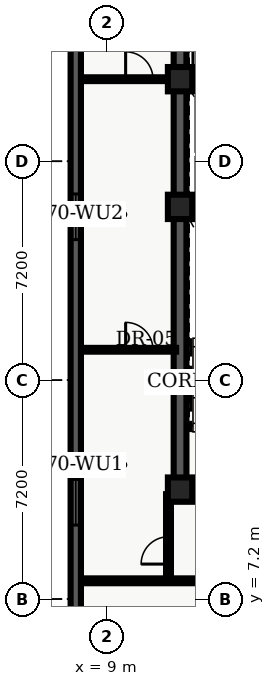
"""IFC4 building model, lengths in metres.
Left out: names, types, materials, properties, quantities, classifications, styles, units other than length and angle.
Written with IfcOpenShell. Run it as: python <this file> out.ifc"""

import sys

from ifc_helpers import new_model, entity, si_unit, converted_unit, direction, frame, origin_with_axes, origin_2d_with_axis, place, context, subcontext, project, spatial, polyline, rectangle, outline, extrude, element, fill, save


model = new_model("IFC4")
c1 = context("Model", 3, precision=1e-05, world=origin_with_axes(), true_north=direction((0.0, 1.0)))
c2 = subcontext(c1, "Body", "Model", "MODEL_VIEW")
j1 = project(units=[si_unit("LENGTHUNIT", "METRE"), converted_unit("PLANEANGLEUNIT", "DEGREE", entity("IfcPlaneAngleMeasure", 0.017), si_unit("PLANEANGLEUNIT", "RADIAN"), dimensions=[0, 0, 0, 0, 0, 0, 0])], contexts=[c1])
p1 = place(None, origin_with_axes())
s1 = spatial("IfcSite", under=j1, at=p1, CompositionType="ELEMENT")
p2 = place(p1, origin_with_axes())
s2 = spatial("IfcBuilding", under=s1, at=p2, CompositionType="ELEMENT")
p3 = place(p2, frame((0.0, 0.0, 284.1), z_axis=(0.0, 0.0, 1.0), x_axis=(1.0, 0.0, 0.0)))
s3 = spatial("IfcBuildingStorey", under=s2, at=p3, CompositionType="ELEMENT", Elevation=284.1)
p4 = place(p3, frame((11.4, 10.8, 0.0), z_axis=(0.0, 0.0, 1.0), x_axis=(0.0, 1.0, 0.0)))
e1 = element("IfcWall", 1, at=p4, inside=s3, PredefinedType="SHEAR", context=c2, shape_type="SweptSolid", body=[
    extrude(outline(polyline([(0.0, -0.21), (27.0, -0.21), (27.0, 0.21), (0.0, 0.21), (0.0, -0.21)])), origin_with_axes(), (0.0, 0.0, 1.0), 3.6),
])
p5 = place(p3, frame((11.4, 10.8, 0.0), z_axis=(0.0, 0.0, 1.0), x_axis=(1.0, 0.0, 0.0)))
e2 = element("IfcWall", 2, at=p5, inside=s3, PredefinedType="SHEAR", context=c2, shape_type="SweptSolid", body=[
    extrude(outline(polyline([(0.0, -0.21), (7.2, -0.21), (7.2, 0.21), (0.0, 0.21), (0.0, -0.21)])), origin_with_axes(), (0.0, 0.0, 1.0), 3.6),
])
p6 = place(p5, frame((2.625, 0.0, 0.0), z_axis=(0.0, 0.0, 1.0), x_axis=(1.0, 0.0, 0.0)))
e3 = element("IfcOpeningElement", 3, at=p6, cuts=e2, PredefinedType="OPENING", context=c2, shape_type="SweptSolid", body=[
    extrude(rectangle(XDim=1.05, YDim=0.44, at=origin_2d_with_axis()), origin_with_axes(), (0.0, 0.0, 1.0), 2.15),
])
p7 = place(p3, frame((11.61, 19.825, 0.0), z_axis=(0.0, 0.0, 1.0), x_axis=(1.0, 0.0, 0.0)))
e4 = element("IfcWall", 4, at=p7, inside=s3, PredefinedType="SHEAR", context=c2, shape_type="SweptSolid", body=[
    extrude(outline(polyline([(0.0, -0.125), (6.78, -0.125), (6.78, 0.125), (0.0, 0.125), (0.0, -0.125)])), origin_with_axes(), (0.0, 0.0, 1.0), 3.6),
])
p8 = place(p3, frame((11.7, 24.1, 0.0), z_axis=(0.0, 0.0, 1.0), x_axis=(1.0, 0.0, 0.0)))
e5 = element("IfcWall", 5, at=p8, inside=s3, PredefinedType="SOLIDWALL", context=c2, shape_type="SweptSolid", body=[
    extrude(outline(polyline([(0.0, -0.125), (6.6, -0.125), (6.6, 0.125), (0.0, 0.125), (0.0, -0.125)])), origin_with_axes(), (0.0, 0.0, 1.0), 2.64),
])
p9 = place(p8, frame((3.75, 0.0, 0.0), z_axis=(0.0, 0.0, 1.0), x_axis=(1.0, 0.0, 0.0)))
e6 = element("IfcOpeningElement", 6, at=p9, cuts=e5, PredefinedType="OPENING", context=c2, shape_type="SweptSolid", body=[
    extrude(rectangle(XDim=0.9, YDim=0.27, at=origin_2d_with_axis()), origin_with_axes(), (0.0, 0.0, 1.0), 2.15),
])
for number, where, z_axis, x_axis in (
    (7, (11.4, 10.8, 0.0), (0.0, 0.0, 1.0), (1.0, 0.0, 0.0)),
    (8, (11.4, 20.1, 0.0), (0.0, 0.0, 1.0), (1.0, 0.0, 0.0)),
    (9, (11.4, 24.3, 0.0), (0.0, 0.0, 1.0), (1.0, 0.0, 0.0)),
):
    element("IfcColumn", number, at=place(p3, frame(where, z_axis=z_axis, x_axis=x_axis)), inside=s3, PredefinedType="COLUMN", context=c2, shape_type="SweptSolid", body=[
        extrude(rectangle(XDim=0.8, YDim=0.8, at=origin_2d_with_axis()), origin_with_axes(), (0.0, 0.0, 1.0), 3.9),
    ])
p10 = place(p3, frame((8.135, 7.8, 0.0), z_axis=(0.0, 0.0, 1.0), x_axis=(1.0, 0.0, 0.0)))
e10 = element("IfcWall", 10, at=p10, inside=s3, PredefinedType="PARTITIONING", context=c2, shape_type="SweptSolid", body=[
    extrude(outline(polyline([(0.0, -0.08), (12.165, -0.08), (12.165, 0.08), (0.0, 0.08), (0.0, -0.08)])), origin_with_axes(), (0.0, 0.0, 1.0), 2.64),
])
p11 = place(p10, frame((6.065, 0.0, 0.0), z_axis=(0.0, 0.0, 1.0), x_axis=(1.0, 0.0, 0.0)))
e11 = element("IfcOpeningElement", 11, at=p11, cuts=e10, PredefinedType="OPENING", context=c2, shape_type="SweptSolid", body=[
    extrude(rectangle(XDim=1.0, YDim=0.18, at=origin_2d_with_axis()), origin_with_axes(), (0.0, 0.0, 1.0), 2.15),
])
p12 = place(p3, frame((11.02, 7.8, 0.0), z_axis=(0.0, 0.0, 1.0), x_axis=(0.0, 1.0, 0.0)))
e12 = element("IfcWall", 12, at=p12, inside=s3, PredefinedType="PARTITIONING", context=c2, shape_type="SweptSolid", body=[
    extrude(outline(polyline([(0.0, -0.08), (2.85, -0.08), (2.85, 0.08), (0.0, 0.08), (0.0, -0.08)])), origin_with_axes(), (0.0, 0.0, 1.0), 2.64),
])
p13 = place(p12, frame((1.0, 0.0, 0.0), z_axis=(0.0, 0.0, 1.0), x_axis=(1.0, 0.0, 0.0)))
e13 = element("IfcOpeningElement", 13, at=p13, cuts=e12, PredefinedType="OPENING", context=c2, shape_type="SweptSolid", body=[
    extrude(rectangle(XDim=0.9, YDim=0.18, at=origin_2d_with_axis()), origin_with_axes(), (0.0, 0.0, 1.0), 2.15),
])
p14 = place(p3, frame((8.135, 15.4, 0.0), z_axis=(0.0, 0.0, 1.0), x_axis=(1.0, 0.0, 0.0)))
e14 = element("IfcWall", 14, at=p14, inside=s3, PredefinedType="PARTITIONING", context=c2, shape_type="SweptSolid", body=[
    extrude(outline(polyline([(0.0, -0.062), (3.135, -0.062), (3.135, 0.062), (0.0, 0.062), (0.0, -0.062)])), origin_with_axes(), (0.0, 0.0, 1.0), 2.64),
])
p15 = place(p14, frame((1.925, 0.0, 0.0), z_axis=(0.0, 0.0, 1.0), x_axis=(1.0, 0.0, 0.0)))
e15 = element("IfcOpeningElement", 15, at=p15, cuts=e14, PredefinedType="OPENING", context=c2, shape_type="SweptSolid", body=[
    extrude(rectangle(XDim=0.9, YDim=0.145, at=origin_2d_with_axis()), origin_with_axes(), (0.0, 0.0, 1.0), 2.15),
])
p16 = place(p3, frame((8.135, 24.3, 0.0), z_axis=(0.0, 0.0, 1.0), x_axis=(1.0, 0.0, 0.0)))
e16 = element("IfcWall", 16, at=p16, inside=s3, PredefinedType="PARTITIONING", context=c2, shape_type="SweptSolid", body=[
    extrude(outline(polyline([(0.0, -0.062), (3.135, -0.062), (3.135, 0.062), (0.0, 0.062), (0.0, -0.062)])), origin_with_axes(), (0.0, 0.0, 1.0), 2.64),
])
p17 = place(p16, frame((1.925, 0.0, 0.0), z_axis=(0.0, 0.0, 1.0), x_axis=(1.0, 0.0, 0.0)))
e17 = element("IfcOpeningElement", 17, at=p17, cuts=e16, PredefinedType="OPENING", context=c2, shape_type="SweptSolid", body=[
    extrude(rectangle(XDim=0.9, YDim=0.145, at=origin_2d_with_axis()), origin_with_axes(), (0.0, 0.0, 1.0), 2.15),
])
p18 = place(p3, frame((7.97, 2.74, 0.0), z_axis=(0.0, 0.0, 1.0), x_axis=(0.0, 1.0, 0.0)))
e18 = element("IfcWall", 18, at=p18, inside=s3, PredefinedType="SOLIDWALL", context=c2, shape_type="SweptSolid", body=[
    extrude(outline(polyline([(0.0, -0.17), (43.46, -0.17), (43.46, 0.17), (0.0, 0.17), (0.0, -0.17)])), origin_with_axes(), (0.0, 0.0, 1.0), 3.6),
])
p19 = place(p18, frame((2.948, 0.0, 0.45), z_axis=(0.0, 0.0, 1.0), x_axis=(1.0, 0.0, 0.0)))
e19 = element("IfcOpeningElement", 19, at=p19, cuts=e18, PredefinedType="OPENING", context=c2, shape_type="SweptSolid", body=[
    extrude(rectangle(XDim=1.5, YDim=0.36, at=origin_2d_with_axis()), origin_with_axes(), (0.0, 0.0, 1.0), 2.1),
])
p20 = place(p18, frame((7.643, 0.0, 0.45), z_axis=(0.0, 0.0, 1.0), x_axis=(1.0, 0.0, 0.0)))
e20 = element("IfcOpeningElement", 20, at=p20, cuts=e18, PredefinedType="OPENING", context=c2, shape_type="SweptSolid", body=[
    extrude(rectangle(XDim=1.5, YDim=0.36, at=origin_2d_with_axis()), origin_with_axes(), (0.0, 0.0, 1.0), 2.1),
])
p21 = place(p18, frame((17.034, 0.0, 0.45), z_axis=(0.0, 0.0, 1.0), x_axis=(1.0, 0.0, 0.0)))
e21 = element("IfcOpeningElement", 21, at=p21, cuts=e18, PredefinedType="OPENING", context=c2, shape_type="SweptSolid", body=[
    extrude(rectangle(XDim=1.5, YDim=0.36, at=origin_2d_with_axis()), origin_with_axes(), (0.0, 0.0, 1.0), 2.1),
])
p22 = place(p18, frame((26.426, 0.0, 0.45), z_axis=(0.0, 0.0, 1.0), x_axis=(1.0, 0.0, 0.0)))
e22 = element("IfcOpeningElement", 22, at=p22, cuts=e18, PredefinedType="OPENING", context=c2, shape_type="SweptSolid", body=[
    extrude(rectangle(XDim=1.5, YDim=0.36, at=origin_2d_with_axis()), origin_with_axes(), (0.0, 0.0, 1.0), 2.1),
])
p23 = place(p18, frame((31.571, 0.0, 0.45), z_axis=(0.0, 0.0, 1.0), x_axis=(1.0, 0.0, 0.0)))
e23 = element("IfcOpeningElement", 23, at=p23, cuts=e18, PredefinedType="OPENING", context=c2, shape_type="SweptSolid", body=[
    extrude(rectangle(XDim=1.5, YDim=0.36, at=origin_2d_with_axis()), origin_with_axes(), (0.0, 0.0, 1.0), 2.1),
])
p24 = place(p18, frame((35.817, 0.0, 0.45), z_axis=(0.0, 0.0, 1.0), x_axis=(1.0, 0.0, 0.0)))
e24 = element("IfcOpeningElement", 24, at=p24, cuts=e18, PredefinedType="OPENING", context=c2, shape_type="SweptSolid", body=[
    extrude(rectangle(XDim=1.5, YDim=0.36, at=origin_2d_with_axis()), origin_with_axes(), (0.0, 0.0, 1.0), 2.1),
])
p25 = place(p18, frame((40.512, 0.0, 0.45), z_axis=(0.0, 0.0, 1.0), x_axis=(1.0, 0.0, 0.0)))
e25 = element("IfcOpeningElement", 25, at=p25, cuts=e18, PredefinedType="OPENING", context=c2, shape_type="SweptSolid", body=[
    extrude(rectangle(XDim=1.5, YDim=0.36, at=origin_2d_with_axis()), origin_with_axes(), (0.0, 0.0, 1.0), 2.1),
])
p26 = place(p14, frame((1.925, 0.0, 0.0), z_axis=(0.0, 0.0, 1.0), x_axis=(1.0, 0.0, 0.0)))
e26 = element("IfcDoor", 26, at=p26, inside=s3, OperationType="SINGLE_SWING_LEFT", PredefinedType="DOOR", context=c2, shape_type="SweptSolid", body=[
    extrude(rectangle(XDim=0.9, YDim=0.075, at=origin_2d_with_axis()), origin_with_axes(), (0.0, 0.0, 1.0), 2.15),
])
fill(e15, e26)
p27 = place(p16, frame((1.925, 0.0, 0.0), z_axis=(0.0, 0.0, 1.0), x_axis=(1.0, 0.0, 0.0)))
e27 = element("IfcDoor", 27, at=p27, inside=s3, OperationType="SINGLE_SWING_LEFT", PredefinedType="DOOR", context=c2, shape_type="SweptSolid", body=[
    extrude(rectangle(XDim=0.9, YDim=0.075, at=origin_2d_with_axis()), origin_with_axes(), (0.0, 0.0, 1.0), 2.15),
])
fill(e17, e27)
p28 = place(p12, frame((1.0, 0.0, 0.0), z_axis=(0.0, 0.0, 1.0), x_axis=(1.0, 0.0, 0.0)))
e28 = element("IfcDoor", 28, at=p28, inside=s3, OperationType="SINGLE_SWING_LEFT", PredefinedType="DOOR", context=c2, shape_type="SweptSolid", body=[
    extrude(rectangle(XDim=0.9, YDim=0.09, at=origin_2d_with_axis()), origin_with_axes(), (0.0, 0.0, 1.0), 2.15),
])
fill(e13, e28)
p29 = place(p18, frame((7.643, 0.0, 0.45), z_axis=(0.0, 0.0, 1.0), x_axis=(1.0, 0.0, 0.0)))
e29 = element("IfcWindow", 29, at=p29, inside=s3, PredefinedType="WINDOW", context=c2, shape_type="SweptSolid", body=[
    extrude(rectangle(XDim=1.5, YDim=0.09, at=origin_2d_with_axis()), origin_with_axes(), (0.0, 0.0, 1.0), 2.1),
])
fill(e20, e29)
p30 = place(p18, frame((17.034, 0.0, 0.45), z_axis=(0.0, 0.0, 1.0), x_axis=(1.0, 0.0, 0.0)))
e30 = element("IfcWindow", 30, at=p30, inside=s3, PredefinedType="WINDOW", context=c2, shape_type="SweptSolid", body=[
    extrude(rectangle(XDim=1.5, YDim=0.09, at=origin_2d_with_axis()), origin_with_axes(), (0.0, 0.0, 1.0), 2.1),
])
fill(e21, e30)
save(model, sys.argv[1])
